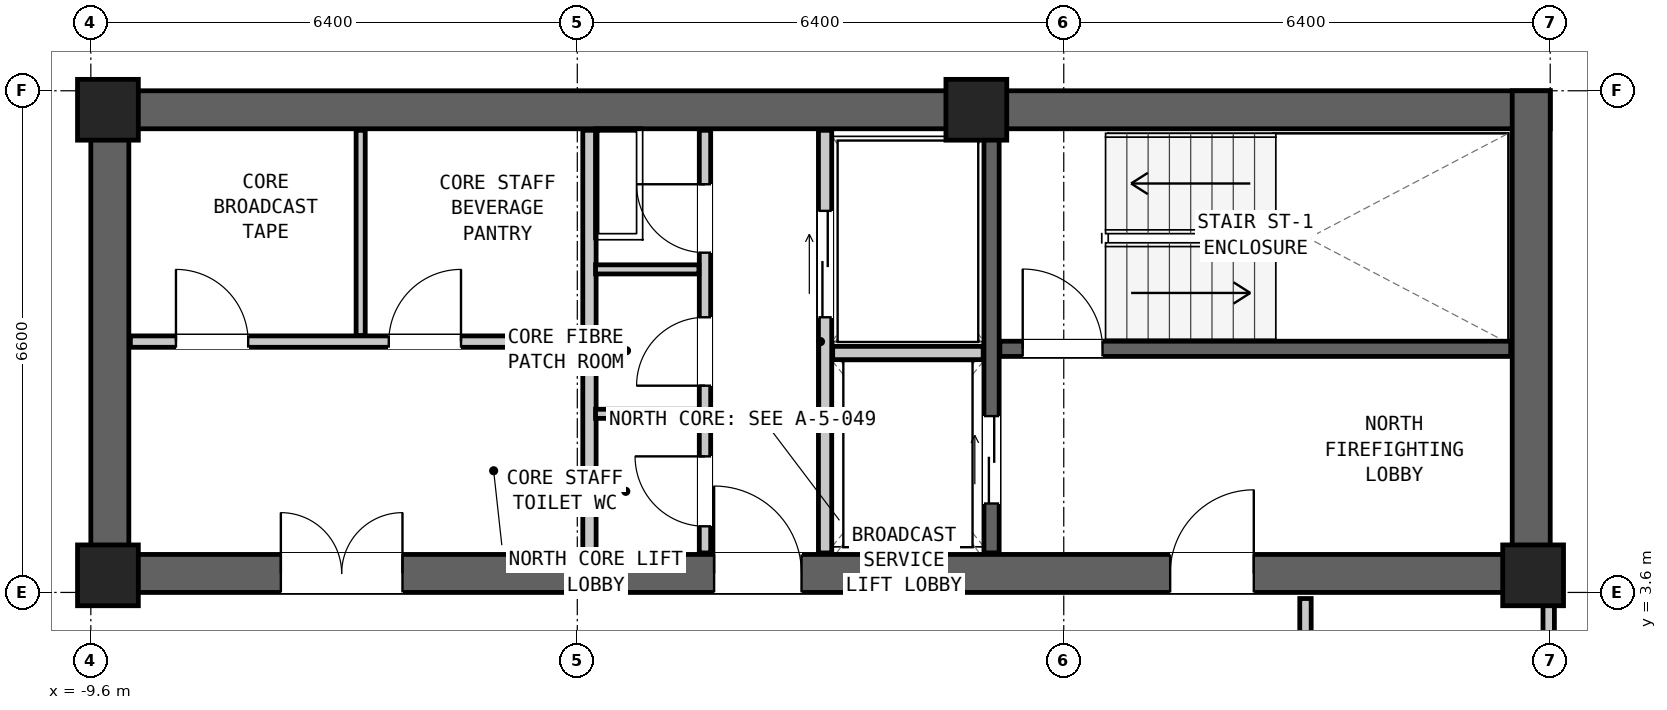
"""IFC4 building model, lengths in metres.
Left out: names, types, materials, properties, quantities, classifications, styles, units other than length and angle.
Written with IfcOpenShell. Run it as: python <this file> out.ifc"""

import sys

from ifc_helpers import new_model, si_unit, direction, frame, frame_2d, origin, origin_2d, place, context, subcontext, project, spatial, rectangle, extrude, element, fill, save


model = new_model("IFC4")
c1 = context("Model", 3, precision=1e-05, world=origin(), true_north=direction((0.0, 1.0)))
c2 = subcontext(c1, "Body", "Model", "MODEL_VIEW")
j1 = project(units=[si_unit("LENGTHUNIT", "METRE"), si_unit("PLANEANGLEUNIT", "RADIAN")], contexts=[c1])
p1 = place(None, origin())
s1 = spatial("IfcSite", under=j1, at=p1, CompositionType="ELEMENT")
p2 = place(p1, origin())
s2 = spatial("IfcBuilding", under=s1, at=p2, CompositionType="ELEMENT")
p3 = place(p2, frame((0.0, 0.0, 159.2)))
s3 = spatial("IfcBuildingStorey", under=s2, at=p3, CompositionType="ELEMENT", Elevation=159.2)
p4 = place(p3, frame((-9.6, 9.95, 0.0), z_axis=(0.0, 0.0, 1.0), x_axis=(1.0, 0.0, 0.0)))
e1 = element("IfcWall", 1, at=p4, inside=s3, PredefinedType="SHEAR", context=c2, shape_type="SweptSolid", body=[
    extrude(rectangle(XDim=19.2, YDim=0.5, at=frame_2d((9.6, 0.0))), origin(), (0.0, 0.0, 1.0), 3.05),
])
p5 = place(p3, frame((-9.6, 3.85, 0.0), z_axis=(0.0, 0.0, 1.0), x_axis=(1.0, 0.0, 0.0)))
e2 = element("IfcWall", 2, at=p5, inside=s3, PredefinedType="SHEAR", context=c2, shape_type="SweptSolid", body=[
    extrude(rectangle(XDim=19.2, YDim=0.5, at=frame_2d((9.6, 0.0))), origin(), (0.0, 0.0, 1.0), 3.05),
])
p6 = place(p5, frame((14.2, 0.0, 0.0)))
e3 = element("IfcOpeningElement", 3, at=p6, cuts=e2, PredefinedType="OPENING", context=c2, shape_type="SweptSolid", body=[
    extrude(rectangle(XDim=1.1, YDim=2.08, at=frame_2d((0.55, 1.04))), frame((0.0, 0.262, 0.0), z_axis=(0.0, -1.0, 0.0), x_axis=(1.0, 0.0, 0.0)), (0.0, 0.0, 1.0), 0.524),
])
p7 = place(p5, frame((8.2, 0.0, 0.0)))
e4 = element("IfcOpeningElement", 4, at=p7, cuts=e2, PredefinedType="OPENING", context=c2, shape_type="SweptSolid", body=[
    extrude(rectangle(XDim=1.15, YDim=2.1, at=frame_2d((0.575, 1.05))), frame((0.0, 0.262, 0.0), z_axis=(0.0, -1.0, 0.0), x_axis=(1.0, 0.0, 0.0)), (0.0, 0.0, 1.0), 0.524),
])
p8 = place(p5, frame((2.5, 0.0, 0.0)))
e5 = element("IfcOpeningElement", 5, at=p8, cuts=e2, PredefinedType="OPENING", context=c2, shape_type="SweptSolid", body=[
    extrude(rectangle(XDim=1.6, YDim=2.12, at=frame_2d((0.8, 1.06))), frame((0.0, 0.262, 0.0), z_axis=(0.0, -1.0, 0.0), x_axis=(1.0, 0.0, 0.0)), (0.0, 0.0, 1.0), 0.524),
])
for number, where, z_axis, x_axis in (
    (6, (-9.35, 3.6, 0.0), (0.0, 0.0, 1.0), (0.0, 1.0, 0.0)),
    (7, (9.35, 3.6, 0.0), (0.0, 0.0, 1.0), (0.0, 1.0, 0.0)),
):
    element("IfcWall", number, at=place(p3, frame(where, z_axis=z_axis, x_axis=x_axis)), inside=s3, PredefinedType="SHEAR", context=c2, shape_type="SweptSolid", body=[
        extrude(rectangle(XDim=6.6, YDim=0.5, at=frame_2d((3.3, 0.0))), origin(), (0.0, 0.0, 1.0), 3.05),
    ])
for number, where, z_axis, x_axis in (
    (8, (-9.375, 9.95, 0.0), (0.0, 0.0, 1.0), (1.0, 0.0, 0.0)),
    (9, (2.05, 9.95, 0.0), (0.0, 0.0, 1.0), (1.0, 0.0, 0.0)),
    (10, (-9.375, 3.825, 0.0), (0.0, 0.0, 1.0), (1.0, 0.0, 0.0)),
    (11, (9.375, 3.825, 0.0), (0.0, 0.0, 1.0), (1.0, 0.0, 0.0)),
):
    element("IfcColumn", number, at=place(p3, frame(where, z_axis=z_axis, x_axis=x_axis)), inside=s3, PredefinedType="COLUMN", context=c2, shape_type="SweptSolid", body=[
        extrude(rectangle(XDim=0.8, YDim=0.8, at=origin_2d()), origin(), (0.0, 0.0, 1.0), 3.05),
    ])
p9 = place(p3, frame((2.36, 6.805, 0.0), z_axis=(0.0, 0.0, 1.0), x_axis=(1.0, 0.0, 0.0)))
e12 = element("IfcWall", 12, at=p9, inside=s3, PredefinedType="SHEAR", context=c2, shape_type="SweptSolid", body=[
    extrude(rectangle(XDim=6.72, YDim=0.2, at=frame_2d((3.36, 0.0))), origin(), (0.0, 0.0, 1.0), 2.83),
])
p10 = place(p9, frame((0.3, 0.0, 0.0)))
e13 = element("IfcOpeningElement", 13, at=p10, cuts=e12, PredefinedType="OPENING", context=c2, shape_type="SweptSolid", body=[
    extrude(rectangle(XDim=1.05, YDim=2.08, at=frame_2d((0.525, 1.04))), frame((0.0, 0.112, 0.0), z_axis=(0.0, -1.0, 0.0), x_axis=(1.0, 0.0, 0.0)), (0.0, 0.0, 1.0), 0.224),
])
p11 = place(p3, frame((2.25, 4.12, 0.0), z_axis=(0.0, 0.0, 1.0), x_axis=(0.0, 1.0, 0.0)))
e14 = element("IfcWall", 14, at=p11, inside=s3, PredefinedType="SHEAR", context=c2, shape_type="SweptSolid", body=[
    extrude(rectangle(XDim=5.56, YDim=0.2, at=frame_2d((2.78, 0.0))), origin(), (0.0, 0.0, 1.0), 2.83),
])
p12 = place(p11, frame((0.65, 0.0, 0.0)))
e15 = element("IfcOpeningElement", 15, at=p12, cuts=e14, PredefinedType="OPENING", context=c2, shape_type="SweptSolid", body=[
    extrude(rectangle(XDim=1.15, YDim=2.08, at=frame_2d((0.575, 1.04))), frame((0.0, 0.112, 0.0), z_axis=(0.0, -1.0, 0.0), x_axis=(1.0, 0.0, 0.0)), (0.0, 0.0, 1.0), 0.224),
])
p13 = place(p3, frame((0.06, 4.12, 0.0), z_axis=(0.0, 0.0, 1.0), x_axis=(0.0, 1.0, 0.0)))
e16 = element("IfcWall", 16, at=p13, inside=s3, PredefinedType="PARTITIONING", context=c2, shape_type="SweptSolid", body=[
    extrude(rectangle(XDim=5.56, YDim=0.175, at=frame_2d((2.78, 0.0))), origin(), (0.0, 0.0, 1.0), 2.83),
])
p14 = place(p13, frame((3.1, 0.0, 0.0)))
e17 = element("IfcOpeningElement", 17, at=p14, cuts=e16, PredefinedType="OPENING", context=c2, shape_type="SweptSolid", body=[
    extrude(rectangle(XDim=1.4, YDim=2.12, at=frame_2d((0.7, 1.06))), frame((0.0, 0.1, 0.0), z_axis=(0.0, -1.0, 0.0), x_axis=(1.0, 0.0, 0.0)), (0.0, 0.0, 1.0), 0.199),
])
p15 = place(p3, frame((0.16, 6.75, 0.0), z_axis=(0.0, 0.0, 1.0), x_axis=(1.0, 0.0, 0.0)))
e18 = element("IfcWall", 18, at=p15, inside=s3, PredefinedType="PARTITIONING", context=c2, shape_type="SweptSolid", body=[
    extrude(rectangle(XDim=1.98, YDim=0.175, at=frame_2d((0.99, 0.0))), origin(), (0.0, 0.0, 1.0), 2.83),
])
p16 = place(p3, frame((-3.04, 4.12, 0.0), z_axis=(0.0, 0.0, 1.0), x_axis=(0.0, 1.0, 0.0)))
e19 = element("IfcWall", 19, at=p16, inside=s3, PredefinedType="PARTITIONING", context=c2, shape_type="SweptSolid", body=[
    extrude(rectangle(XDim=5.56, YDim=0.175, at=frame_2d((2.78, 0.0))), origin(), (0.0, 0.0, 1.0), 2.83),
])
p17 = place(p3, frame((-1.52, 4.12, 0.0), z_axis=(0.0, 0.0, 1.0), x_axis=(0.0, 1.0, 0.0)))
e20 = element("IfcWall", 20, at=p17, inside=s3, PredefinedType="PARTITIONING", context=c2, shape_type="SweptSolid", body=[
    extrude(rectangle(XDim=5.56, YDim=0.15, at=frame_2d((2.78, 0.0))), origin(), (0.0, 0.0, 1.0), 2.83),
])
p18 = place(p17, frame((3.95, 0.0, 0.0)))
e21 = element("IfcOpeningElement", 21, at=p18, cuts=e20, PredefinedType="OPENING", context=c2, shape_type="SweptSolid", body=[
    extrude(rectangle(XDim=0.9, YDim=2.05, at=frame_2d((0.45, 1.025))), frame((0.0, 0.087, 0.0), z_axis=(0.0, -1.0, 0.0), x_axis=(1.0, 0.0, 0.0)), (0.0, 0.0, 1.0), 0.174),
])
p19 = place(p17, frame((2.2, 0.0, 0.0)))
e22 = element("IfcOpeningElement", 22, at=p19, cuts=e20, PredefinedType="OPENING", context=c2, shape_type="SweptSolid", body=[
    extrude(rectangle(XDim=0.9, YDim=2.05, at=frame_2d((0.45, 1.025))), frame((0.0, 0.087, 0.0), z_axis=(0.0, -1.0, 0.0), x_axis=(1.0, 0.0, 0.0)), (0.0, 0.0, 1.0), 0.174),
])
p20 = place(p17, frame((0.35, 0.0, 0.0)))
e23 = element("IfcOpeningElement", 23, at=p20, cuts=e20, PredefinedType="OPENING", context=c2, shape_type="SweptSolid", body=[
    extrude(rectangle(XDim=0.92, YDim=2.1, at=frame_2d((0.46, 1.05))), frame((0.0, 0.087, 0.0), z_axis=(0.0, -1.0, 0.0), x_axis=(1.0, 0.0, 0.0)), (0.0, 0.0, 1.0), 0.174),
])
for number, where, z_axis, x_axis in (
    (24, (-2.96, 5.95, 0.0), (0.0, 0.0, 1.0), (1.0, 0.0, 0.0)),
    (25, (-2.96, 7.85, 0.0), (0.0, 0.0, 1.0), (1.0, 0.0, 0.0)),
):
    element("IfcWall", number, at=place(p3, frame(where, z_axis=z_axis, x_axis=x_axis)), inside=s3, PredefinedType="PARTITIONING", context=c2, shape_type="SweptSolid", body=[
        extrude(rectangle(XDim=1.36, YDim=0.12, at=frame_2d((0.68, 0.0))), origin(), (0.0, 0.0, 1.0), 2.83),
    ])
p21 = place(p3, frame((-9.08, 6.9, 0.0), z_axis=(0.0, 0.0, 1.0), x_axis=(1.0, 0.0, 0.0)))
e26 = element("IfcWall", 26, at=p21, inside=s3, PredefinedType="PARTITIONING", context=c2, shape_type="SweptSolid", body=[
    extrude(rectangle(XDim=5.96, YDim=0.15, at=frame_2d((2.98, 0.0))), origin(), (0.0, 0.0, 1.0), 2.83),
])
p22 = place(p21, frame((0.6, 0.0, 0.0)))
e27 = element("IfcOpeningElement", 27, at=p22, cuts=e26, PredefinedType="OPENING", context=c2, shape_type="SweptSolid", body=[
    extrude(rectangle(XDim=0.95, YDim=2.1, at=frame_2d((0.475, 1.05))), frame((0.0, 0.087, 0.0), z_axis=(0.0, -1.0, 0.0), x_axis=(1.0, 0.0, 0.0)), (0.0, 0.0, 1.0), 0.174),
])
p23 = place(p21, frame((3.4, 0.0, 0.0)))
e28 = element("IfcOpeningElement", 28, at=p23, cuts=e26, PredefinedType="OPENING", context=c2, shape_type="SweptSolid", body=[
    extrude(rectangle(XDim=0.95, YDim=2.1, at=frame_2d((0.475, 1.05))), frame((0.0, 0.087, 0.0), z_axis=(0.0, -1.0, 0.0), x_axis=(1.0, 0.0, 0.0)), (0.0, 0.0, 1.0), 0.174),
])
p24 = place(p3, frame((-6.05, 6.98, 0.0), z_axis=(0.0, 0.0, 1.0), x_axis=(0.0, 1.0, 0.0)))
e29 = element("IfcWall", 29, at=p24, inside=s3, PredefinedType="PARTITIONING", context=c2, shape_type="SweptSolid", body=[
    extrude(rectangle(XDim=2.7, YDim=0.12, at=frame_2d((1.35, 0.0))), origin(), (0.0, 0.0, 1.0), 2.83),
])
p25 = place(p3, frame((6.38, -2.32, 0.0), z_axis=(0.0, 0.0, 1.0), x_axis=(0.0, 1.0, 0.0)))
e30 = element("IfcWall", 30, at=p25, inside=s3, PredefinedType="PARTITIONING", context=c2, shape_type="SweptSolid", body=[
    extrude(rectangle(XDim=5.84, YDim=0.15, at=frame_2d((2.92, 0.0))), origin(), (0.0, 0.0, 1.0), 2.198),
])
p26 = place(p3, frame((9.58, -2.32, 0.0), z_axis=(0.0, 0.0, 1.0), x_axis=(0.0, 1.0, 0.0)))
e31 = element("IfcWall", 31, at=p26, inside=s3, PredefinedType="PARTITIONING", context=c2, shape_type="SweptSolid", body=[
    extrude(rectangle(XDim=5.84, YDim=0.15, at=frame_2d((2.92, 0.0))), origin(), (0.0, 0.0, 1.0), 2.198),
])
p27 = place(p26, frame((2.445, 0.0, 0.0)))
e32 = element("IfcOpeningElement", 32, at=p27, cuts=e31, PredefinedType="OPENING", context=c2, shape_type="SweptSolid", body=[
    extrude(rectangle(XDim=0.95, YDim=2.1, at=frame_2d((0.475, 1.05))), frame((0.0, 0.087, 0.0), z_axis=(0.0, -1.0, 0.0), x_axis=(1.0, 0.0, 0.0)), (0.0, 0.0, 1.0), 0.174),
])
p28 = place(p10, origin())
e33 = element("IfcDoor", 33, at=p28, inside=s3, OperationType="SINGLE_SWING_LEFT", PredefinedType="DOOR", context=c2, shape_type="SweptSolid", body=[
    extrude(rectangle(XDim=1.05, YDim=2.08, at=frame_2d((0.525, 1.04))), frame((0.0, 0.025, 0.0), z_axis=(0.0, -1.0, 0.0), x_axis=(1.0, 0.0, 0.0)), (0.0, 0.0, 1.0), 0.05),
])
fill(e13, e33)
p29 = place(p6, origin())
e34 = element("IfcDoor", 34, at=p29, inside=s3, OperationType="SINGLE_SWING_RIGHT", PredefinedType="DOOR", context=c2, shape_type="SweptSolid", body=[
    extrude(rectangle(XDim=1.1, YDim=2.08, at=frame_2d((0.55, 1.04))), frame((0.0, 0.025, 0.0), z_axis=(0.0, -1.0, 0.0), x_axis=(1.0, 0.0, 0.0)), (0.0, 0.0, 1.0), 0.05),
])
fill(e3, e34)
p30 = place(p12, origin())
e35 = element("IfcDoor", 35, at=p30, inside=s3, OperationType="DOUBLE_DOOR_SLIDING", PredefinedType="DOOR", context=c2, shape_type="SweptSolid", body=[
    extrude(rectangle(XDim=1.15, YDim=2.08, at=frame_2d((0.575, 1.04))), frame((0.0, 0.025, 0.0), z_axis=(0.0, -1.0, 0.0), x_axis=(1.0, 0.0, 0.0)), (0.0, 0.0, 1.0), 0.05),
])
fill(e15, e35)
p31 = place(p14, origin())
e36 = element("IfcDoor", 36, at=p31, inside=s3, OperationType="DOUBLE_DOOR_SLIDING", PredefinedType="DOOR", context=c2, shape_type="SweptSolid", body=[
    extrude(rectangle(XDim=1.4, YDim=2.12, at=frame_2d((0.7, 1.06))), frame((0.0, 0.025, 0.0), z_axis=(0.0, -1.0, 0.0), x_axis=(1.0, 0.0, 0.0)), (0.0, 0.0, 1.0), 0.05),
])
fill(e17, e36)
p32 = place(p7, origin())
e37 = element("IfcDoor", 37, at=p32, inside=s3, OperationType="SINGLE_SWING_LEFT", PredefinedType="DOOR", context=c2, shape_type="SweptSolid", body=[
    extrude(rectangle(XDim=1.15, YDim=2.1, at=frame_2d((0.575, 1.05))), frame((0.0, 0.025, 0.0), z_axis=(0.0, -1.0, 0.0), x_axis=(1.0, 0.0, 0.0)), (0.0, 0.0, 1.0), 0.05),
])
fill(e4, e37)
p33 = place(p18, origin())
e38 = element("IfcDoor", 38, at=p33, inside=s3, OperationType="SINGLE_SWING_RIGHT", PredefinedType="DOOR", context=c2, shape_type="SweptSolid", body=[
    extrude(rectangle(XDim=0.9, YDim=2.05, at=frame_2d((0.45, 1.025))), frame((0.0, 0.025, 0.0), z_axis=(0.0, -1.0, 0.0), x_axis=(1.0, 0.0, 0.0)), (0.0, 0.0, 1.0), 0.05),
])
fill(e21, e38)
p34 = place(p19, origin())
e39 = element("IfcDoor", 39, at=p34, inside=s3, OperationType="SINGLE_SWING_LEFT", PredefinedType="DOOR", context=c2, shape_type="SweptSolid", body=[
    extrude(rectangle(XDim=0.9, YDim=2.05, at=frame_2d((0.45, 1.025))), frame((0.0, 0.025, 0.0), z_axis=(0.0, -1.0, 0.0), x_axis=(1.0, 0.0, 0.0)), (0.0, 0.0, 1.0), 0.05),
])
fill(e22, e39)
p35 = place(p20, origin())
e40 = element("IfcDoor", 40, at=p35, inside=s3, OperationType="SINGLE_SWING_RIGHT", PredefinedType="DOOR", context=c2, shape_type="SweptSolid", body=[
    extrude(rectangle(XDim=0.92, YDim=2.1, at=frame_2d((0.46, 1.05))), frame((0.0, 0.025, 0.0), z_axis=(0.0, -1.0, 0.0), x_axis=(1.0, 0.0, 0.0)), (0.0, 0.0, 1.0), 0.05),
])
fill(e23, e40)
p36 = place(p8, origin())
e41 = element("IfcDoor", 41, at=p36, inside=s3, OperationType="DOUBLE_DOOR_SINGLE_SWING", PredefinedType="DOOR", context=c2, shape_type="SweptSolid", body=[
    extrude(rectangle(XDim=1.6, YDim=2.12, at=frame_2d((0.8, 1.06))), frame((0.0, 0.025, 0.0), z_axis=(0.0, -1.0, 0.0), x_axis=(1.0, 0.0, 0.0)), (0.0, 0.0, 1.0), 0.05),
])
fill(e5, e41)
p37 = place(p22, origin())
e42 = element("IfcDoor", 42, at=p37, inside=s3, OperationType="SINGLE_SWING_LEFT", PredefinedType="DOOR", context=c2, shape_type="SweptSolid", body=[
    extrude(rectangle(XDim=0.95, YDim=2.1, at=frame_2d((0.475, 1.05))), frame((0.0, 0.025, 0.0), z_axis=(0.0, -1.0, 0.0), x_axis=(1.0, 0.0, 0.0)), (0.0, 0.0, 1.0), 0.05),
])
fill(e27, e42)
p38 = place(p23, origin())
e43 = element("IfcDoor", 43, at=p38, inside=s3, OperationType="SINGLE_SWING_RIGHT", PredefinedType="DOOR", context=c2, shape_type="SweptSolid", body=[
    extrude(rectangle(XDim=0.95, YDim=2.1, at=frame_2d((0.475, 1.05))), frame((0.0, 0.025, 0.0), z_axis=(0.0, -1.0, 0.0), x_axis=(1.0, 0.0, 0.0)), (0.0, 0.0, 1.0), 0.05),
])
fill(e28, e43)
save(model, sys.argv[1])
